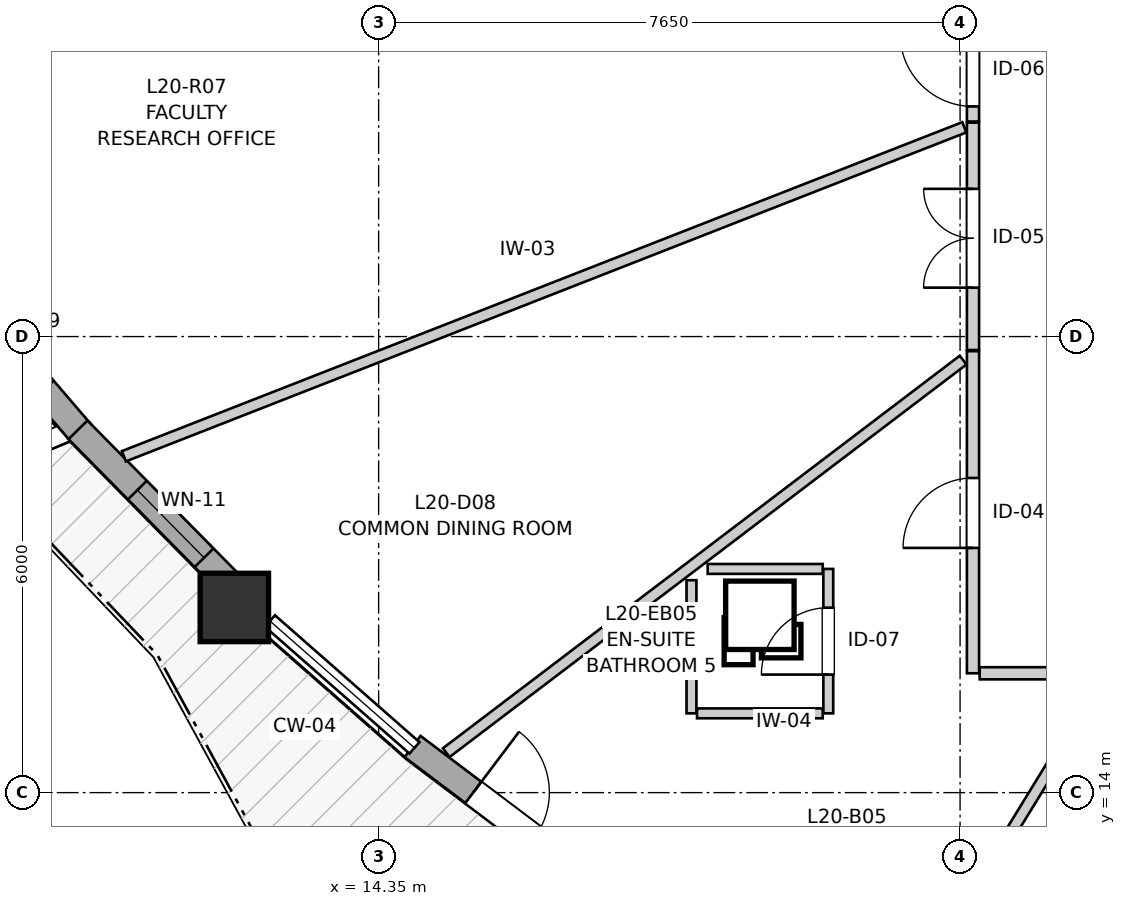
"""IFC4 building model, lengths in metres.
Left out: names, types, materials, properties, quantities, classifications, styles, units other than length and angle.
Written with IfcOpenShell. Run it as: python <this file> out.ifc"""

import sys

from ifc_helpers import new_model, si_unit, direction, frame, frame_2d, origin, origin_2d, place, context, subcontext, project, spatial, rectangle, extrude, source, transform, mapped, element, fill, save


model = new_model("IFC4")
c1 = context("Model", 3, precision=1e-05, world=origin(), true_north=direction((0.0, 1.0)))
c2 = subcontext(c1, "Body", "Model", "MODEL_VIEW")
j1 = project(units=[si_unit("LENGTHUNIT", "METRE"), si_unit("PLANEANGLEUNIT", "RADIAN")], contexts=[c1])
p1 = place(None, origin())
s1 = spatial("IfcSite", under=j1, at=p1, CompositionType="ELEMENT")
p2 = place(p1, origin())
s2 = spatial("IfcBuilding", under=s1, at=p2, CompositionType="ELEMENT")
p3 = place(p2, frame((0.0, 0.0, 70.4)))
s3 = spatial("IfcBuildingStorey", under=s2, at=p3, CompositionType="ELEMENT", Elevation=70.4)
m1 = source(origin(), c2, "Body", "SweptSolid", [
    extrude(rectangle(XDim=0.9, YDim=0.9, at=origin_2d()), origin(), (0.0, 0.0, 1.0), 2.95),
])
p4 = place(p3, frame((12.451, 16.436, 0.0), z_axis=(0.0, 0.0, 1.0), x_axis=(1.0, 0.0, 0.0)))
e1 = element("IfcColumn", 1, at=p4, inside=s3, PredefinedType="COLUMN", context=c2, shape_type="MappedRepresentation", body=[
    mapped(m1, transform((0.0, 0.0, 0.0), x_axis=(1.0, 0.0, 0.0), y_axis=(0.0, 1.0, 0.0), z_axis=(0.0, 0.0, 1.0), scale=1.0)),
])
p5 = place(p3, frame((8.402, 21.102, 0.0), z_axis=(0.0, 0.0, 1.0), x_axis=(0.650797748491, -0.759251138004, 0.0)))
e2 = element("IfcWall", 2, at=p5, inside=s3, PredefinedType="SOLIDWALL", context=c2, shape_type="SweptSolid", body=[
    extrude(rectangle(XDim=3.154, YDim=0.35, at=frame_2d((1.577, 0.0))), origin(), (0.0, 0.0, 1.0), 2.48),
])
p6 = place(p5, frame((0.767, 0.0, 0.82)))
e3 = element("IfcOpeningElement", 3, at=p6, cuts=e2, PredefinedType="OPENING", context=c2, shape_type="SweptSolid", body=[
    extrude(rectangle(XDim=1.6, YDim=1.35, at=frame_2d((0.8, 0.675))), frame((0.0, 0.185, 0.0), z_axis=(0.0, -1.0, 0.0), x_axis=(1.0, 0.0, 0.0)), (0.0, 0.0, 1.0), 0.37),
])
p7 = place(p3, frame((10.394, 18.773, 0.0), z_axis=(0.0, 0.0, 1.0), x_axis=(0.701965316192, -0.712211130819, 0.0)))
e4 = element("IfcWall", 4, at=p7, inside=s3, PredefinedType="SOLIDWALL", context=c2, shape_type="SweptSolid", body=[
    extrude(rectangle(XDim=2.883, YDim=0.35, at=frame_2d((1.442, 0.0))), origin(), (0.0, 0.0, 1.0), 2.48),
])
p8 = place(p7, frame((1.113, 0.0, 0.82)))
e5 = element("IfcOpeningElement", 5, at=p8, cuts=e4, PredefinedType="OPENING", context=c2, shape_type="SweptSolid", body=[
    extrude(rectangle(XDim=1.25, YDim=1.35, at=frame_2d((0.625, 0.675))), frame((0.0, 0.185, 0.0), z_axis=(0.0, -1.0, 0.0), x_axis=(1.0, 0.0, 0.0)), (0.0, 0.0, 1.0), 0.37),
])
p9 = place(p3, frame((14.796, 14.606, 0.0), z_axis=(0.0, 0.0, 1.0), x_axis=(0.79839776153, -0.602130396496, 0.0)))
e6 = element("IfcWall", 6, at=p9, inside=s3, PredefinedType="SOLIDWALL", context=c2, shape_type="SweptSolid", body=[
    extrude(rectangle(XDim=3.004, YDim=0.35, at=frame_2d((1.502, 0.0))), origin(), (0.0, 0.0, 1.0), 2.48),
])
p10 = place(p9, frame((1.002, 0.0, 0.0)))
e7 = element("IfcOpeningElement", 7, at=p10, cuts=e6, PredefinedType="OPENING", context=c2, shape_type="SweptSolid", body=[
    extrude(rectangle(XDim=1.0, YDim=2.1, at=frame_2d((0.5, 1.05))), frame((0.0, 0.185, 0.0), z_axis=(0.0, -1.0, 0.0), x_axis=(1.0, 0.0, 0.0)), (0.0, 0.0, 1.0), 0.37),
])
p11 = place(p3, frame((22.17, 15.57, 0.0), z_axis=(0.0, 0.0, 1.0), x_axis=(0.0, 1.0, 0.0)))
e8 = element("IfcWall", 8, at=p11, inside=s3, PredefinedType="PARTITIONING", context=c2, shape_type="SweptSolid", body=[
    extrude(rectangle(XDim=4.238, YDim=0.16, at=frame_2d((2.119, 0.0))), origin(), (0.0, 0.0, 1.0), 2.95),
])
p12 = place(p11, frame((1.649, 0.0, 0.0)))
e9 = element("IfcOpeningElement", 9, at=p12, cuts=e8, PredefinedType="OPENING", context=c2, shape_type="SweptSolid", body=[
    extrude(rectangle(XDim=0.92, YDim=2.1, at=frame_2d((0.46, 1.05))), frame((0.0, 0.09, 0.0), z_axis=(0.0, -1.0, 0.0), x_axis=(1.0, 0.0, 0.0)), (0.0, 0.0, 1.0), 0.18),
])
p13 = place(p3, frame((22.17, 19.823, 0.0), z_axis=(0.0, 0.0, 1.0), x_axis=(0.0, 1.0, 0.0)))
e10 = element("IfcWall", 10, at=p13, inside=s3, PredefinedType="PARTITIONING", context=c2, shape_type="SweptSolid", body=[
    extrude(rectangle(XDim=2.991, YDim=0.16, at=frame_2d((1.496, 0.0))), origin(), (0.0, 0.0, 1.0), 2.95),
])
p14 = place(p13, frame((0.821, 0.0, 0.0)))
e11 = element("IfcOpeningElement", 11, at=p14, cuts=e10, PredefinedType="OPENING", context=c2, shape_type="SweptSolid", body=[
    extrude(rectangle(XDim=1.3, YDim=2.1, at=frame_2d((0.65, 1.05))), frame((0.0, 0.09, 0.0), z_axis=(0.0, -1.0, 0.0), x_axis=(1.0, 0.0, 0.0)), (0.0, 0.0, 1.0), 0.18),
])
p15 = place(p3, frame((20.266, 15.043, 0.0), z_axis=(0.0, 0.0, 1.0), x_axis=(0.0, 1.0, 0.0)))
e12 = element("IfcWall", 12, at=p15, inside=s3, PredefinedType="PARTITIONING", context=c2, shape_type="SweptSolid", body=[
    extrude(rectangle(XDim=1.9, YDim=0.13, at=frame_2d((0.95, 0.0))), origin(), (0.0, 0.0, 1.0), 2.95),
])
p16 = place(p15, frame((0.51, 0.0, 0.0)))
e13 = element("IfcOpeningElement", 13, at=p16, cuts=e12, PredefinedType="OPENING", context=c2, shape_type="SweptSolid", body=[
    extrude(rectangle(XDim=0.88, YDim=2.05, at=frame_2d((0.44, 1.025))), frame((0.0, 0.075, 0.0), z_axis=(0.0, -1.0, 0.0), x_axis=(1.0, 0.0, 0.0)), (0.0, 0.0, 1.0), 0.15),
])
p17 = place(p3, frame((22.17, 22.829, 0.0), z_axis=(0.0, 0.0, 1.0), x_axis=(0.0, 1.0, 0.0)))
e14 = element("IfcWall", 14, at=p17, inside=s3, PredefinedType="PARTITIONING", context=c2, shape_type="SweptSolid", body=[
    extrude(rectangle(XDim=1.321, YDim=0.16, at=frame_2d((0.66, 0.0))), origin(), (0.0, 0.0, 1.0), 2.95),
])
p18 = place(p17, frame((0.198, 0.0, 0.0)))
e15 = element("IfcOpeningElement", 15, at=p18, cuts=e14, PredefinedType="OPENING", context=c2, shape_type="SweptSolid", body=[
    extrude(rectangle(XDim=0.96, YDim=2.1, at=frame_2d((0.48, 1.05))), frame((0.0, 0.09, 0.0), z_axis=(0.0, -1.0, 0.0), x_axis=(1.0, 0.0, 0.0)), (0.0, 0.0, 1.0), 0.18),
])
p19 = place(p3, frame((10.998, 18.425, 0.0), z_axis=(0.0, 0.0, 1.0), x_axis=(0.931213049878, 0.364475315676, 0.0)))
e16 = element("IfcWall", 16, at=p19, inside=s3, PredefinedType="PARTITIONING", context=c2, shape_type="SweptSolid", body=[
    extrude(rectangle(XDim=11.875, YDim=0.145, at=frame_2d((5.938, 0.0))), origin(), (0.0, 0.0, 1.0), 2.95),
])
p20 = place(p3, frame((15.239, 14.526, 0.0), z_axis=(0.0, 0.0, 1.0), x_axis=(0.796393529077, 0.604778758592, 0.0)))
e17 = element("IfcWall", 17, at=p20, inside=s3, PredefinedType="PARTITIONING", context=c2, shape_type="SweptSolid", body=[
    extrude(rectangle(XDim=8.539, YDim=0.145, at=frame_2d((4.27, 0.0))), origin(), (0.0, 0.0, 1.0), 2.95),
])
p21 = place(p3, frame((20.973, 10.715, 0.0), z_axis=(0.0, 0.0, 1.0), x_axis=(0.522906546436, 0.852390018533, 0.0)))
e18 = element("IfcWall", 18, at=p21, inside=s3, PredefinedType="PARTITIONING", context=c2, shape_type="SweptSolid", body=[
    extrude(rectangle(XDim=5.55, YDim=0.145, at=frame_2d((2.775, 0.0))), origin(), (0.0, 0.0, 1.0), 2.95),
])
p22 = place(p3, frame((18.466, 15.043, 0.0), z_axis=(0.0, 0.0, 1.0), x_axis=(0.0, 1.0, 0.0)))
e19 = element("IfcWall", 19, at=p22, inside=s3, PredefinedType="PARTITIONING", context=c2, shape_type="SweptSolid", body=[
    extrude(rectangle(XDim=1.752, YDim=0.13, at=frame_2d((0.876, 0.0))), origin(), (0.0, 0.0, 1.0), 2.95),
])
p23 = place(p3, frame((18.679, 16.943, 0.0), z_axis=(0.0, 0.0, 1.0), x_axis=(1.0, 0.0, 0.0)))
e20 = element("IfcWall", 20, at=p23, inside=s3, PredefinedType="PARTITIONING", context=c2, shape_type="SweptSolid", body=[
    extrude(rectangle(XDim=1.514, YDim=0.13, at=frame_2d((0.757, 0.0))), origin(), (0.0, 0.0, 1.0), 2.95),
])
p24 = place(p3, frame((18.539, 15.043, 0.0), z_axis=(0.0, 0.0, 1.0), x_axis=(1.0, 0.0, 0.0)))
e21 = element("IfcWall", 21, at=p24, inside=s3, PredefinedType="PARTITIONING", context=c2, shape_type="SweptSolid", body=[
    extrude(rectangle(XDim=1.654, YDim=0.13, at=frame_2d((0.827, 0.0))), origin(), (0.0, 0.0, 1.0), 2.95),
])
p25 = place(p3, frame((22.258, 15.57, 0.0), z_axis=(0.0, 0.0, 1.0), x_axis=(1.0, 0.0, 0.0)))
e22 = element("IfcWall", 22, at=p25, inside=s3, PredefinedType="PARTITIONING", context=c2, shape_type="SweptSolid", body=[
    extrude(rectangle(XDim=1.52, YDim=0.16, at=frame_2d((0.76, 0.0))), origin(), (0.0, 0.0, 1.0), 2.95),
])
m2 = source(origin(), c2, "Body", "SweptSolid", [
    extrude(rectangle(XDim=1.25, YDim=1.35, at=frame_2d((0.625, 0.675))), frame((0.0, 0.03, 0.0), z_axis=(0.0, -1.0, 0.0), x_axis=(1.0, 0.0, 0.0)), (0.0, 0.0, 1.0), 0.06),
])
p26 = place(p8, origin())
e23 = element("IfcWindow", 23, at=p26, inside=s3, PartitioningType="SINGLE_PANEL", PredefinedType="WINDOW", context=c2, shape_type="MappedRepresentation", body=[
    mapped(m2, transform((0.0, 0.0, 0.0), x_axis=(1.0, 0.0, 0.0), y_axis=(0.0, 1.0, 0.0), z_axis=(0.0, 0.0, 1.0), scale=1.0)),
])
fill(e5, e23)
m3 = source(origin(), c2, "Body", "SweptSolid", [
    extrude(rectangle(XDim=1.0, YDim=2.1, at=frame_2d((0.5, 1.05))), frame((0.0, 0.025, 0.0), z_axis=(0.0, -1.0, 0.0), x_axis=(1.0, 0.0, 0.0)), (0.0, 0.0, 1.0), 0.05),
])
p27 = place(p10, origin())
e24 = element("IfcDoor", 24, at=p27, inside=s3, OperationType="SINGLE_SWING_LEFT", PredefinedType="DOOR", context=c2, shape_type="MappedRepresentation", body=[
    mapped(m3, transform((0.0, 0.0, 0.0), x_axis=(1.0, 0.0, 0.0), y_axis=(0.0, 1.0, 0.0), z_axis=(0.0, 0.0, 1.0), scale=1.0)),
])
fill(e7, e24)
m4 = source(origin(), c2, "Body", "SweptSolid", [
    extrude(rectangle(XDim=0.92, YDim=2.1, at=frame_2d((0.46, 1.05))), frame((0.0, 0.025, 0.0), z_axis=(0.0, -1.0, 0.0), x_axis=(1.0, 0.0, 0.0)), (0.0, 0.0, 1.0), 0.05),
])
p28 = place(p12, origin())
e25 = element("IfcDoor", 25, at=p28, inside=s3, OperationType="SINGLE_SWING_LEFT", PredefinedType="DOOR", context=c2, shape_type="MappedRepresentation", body=[
    mapped(m4, transform((0.0, 0.0, 0.0), x_axis=(1.0, 0.0, 0.0), y_axis=(0.0, 1.0, 0.0), z_axis=(0.0, 0.0, 1.0), scale=1.0)),
])
fill(e9, e25)
m5 = source(origin(), c2, "Body", "SweptSolid", [
    extrude(rectangle(XDim=1.3, YDim=2.1, at=frame_2d((0.65, 1.05))), frame((0.0, 0.025, 0.0), z_axis=(0.0, -1.0, 0.0), x_axis=(1.0, 0.0, 0.0)), (0.0, 0.0, 1.0), 0.05),
])
p29 = place(p14, origin())
e26 = element("IfcDoor", 26, at=p29, inside=s3, OperationType="DOUBLE_DOOR_SINGLE_SWING", PredefinedType="DOOR", context=c2, shape_type="MappedRepresentation", body=[
    mapped(m5, transform((0.0, 0.0, 0.0), x_axis=(1.0, 0.0, 0.0), y_axis=(0.0, 1.0, 0.0), z_axis=(0.0, 0.0, 1.0), scale=1.0)),
])
fill(e11, e26)
m6 = source(origin(), c2, "Body", "SweptSolid", [
    extrude(rectangle(XDim=0.88, YDim=2.05, at=frame_2d((0.44, 1.025))), frame((0.0, 0.025, 0.0), z_axis=(0.0, -1.0, 0.0), x_axis=(1.0, 0.0, 0.0)), (0.0, 0.0, 1.0), 0.05),
])
p30 = place(p16, origin())
e27 = element("IfcDoor", 27, at=p30, inside=s3, OperationType="SINGLE_SWING_LEFT", PredefinedType="DOOR", context=c2, shape_type="MappedRepresentation", body=[
    mapped(m6, transform((0.0, 0.0, 0.0), x_axis=(1.0, 0.0, 0.0), y_axis=(0.0, 1.0, 0.0), z_axis=(0.0, 0.0, 1.0), scale=1.0)),
])
fill(e13, e27)
m7 = source(origin(), c2, "Body", "SweptSolid", [
    extrude(rectangle(XDim=0.96, YDim=2.1, at=frame_2d((0.48, 1.05))), frame((0.0, 0.025, 0.0), z_axis=(0.0, -1.0, 0.0), x_axis=(1.0, 0.0, 0.0)), (0.0, 0.0, 1.0), 0.05),
])
p31 = place(p18, origin())
e28 = element("IfcDoor", 28, at=p31, inside=s3, OperationType="SINGLE_SWING_RIGHT", PredefinedType="DOOR", context=c2, shape_type="MappedRepresentation", body=[
    mapped(m7, transform((0.0, 0.0, 0.0), x_axis=(1.0, 0.0, 0.0), y_axis=(0.0, 1.0, 0.0), z_axis=(0.0, 0.0, 1.0), scale=1.0)),
])
fill(e15, e28)
save(model, sys.argv[1])
